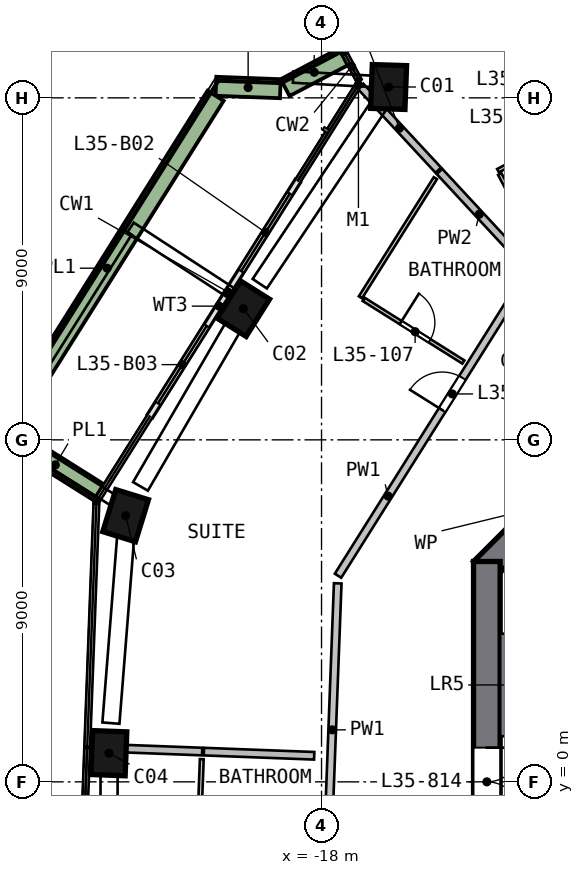
"""IFC4 building model, lengths in metres.
Left out: names, types, materials, properties, quantities, classifications, styles, units other than length and angle.
Written with IfcOpenShell. Run it as: python <this file> out.ifc"""

import sys

from ifc_helpers import new_model, si_unit, direction, frame, frame_2d, origin, origin_2d, place, context, subcontext, project, spatial, polyline, rectangle, outline, extrude, element, fill, save


model = new_model("IFC4")
c1 = context("Model", 3, precision=1e-05, world=origin(), true_north=direction((0.0, 1.0)))
c2 = subcontext(c1, "Body", "Model", "MODEL_VIEW")
j1 = project(units=[si_unit("LENGTHUNIT", "METRE"), si_unit("PLANEANGLEUNIT", "RADIAN")], contexts=[c1])
p1 = place(None, origin())
s1 = spatial("IfcSite", under=j1, at=p1, CompositionType="ELEMENT")
p2 = place(p1, origin())
s2 = spatial("IfcBuilding", under=s1, at=p2, CompositionType="ELEMENT")
p3 = place(p2, frame((0.0, 0.0, 147.0)))
s3 = spatial("IfcBuildingStorey", under=s2, at=p3, CompositionType="ELEMENT", Elevation=147.0)
p4 = place(p3, frame((-16.13, 18.379, 0.0), z_axis=(-0.086733435, -0.07745957, 0.993215649), x_axis=(0.030513173, 0.996298389, 0.080364579)))
e1 = element("IfcColumn", 1, at=p4, inside=s3, PredefinedType="COLUMN", context=c2, shape_type="SweptSolid", body=[
    extrude(rectangle(XDim=1.15, YDim=0.9, at=origin_2d()), origin(), (0.0, 0.0, 1.0), 3.212),
])
p5 = place(p3, frame((-19.986, 12.566, 0.0), z_axis=(-0.05893902, -0.095595288, 0.993673856), x_axis=(-0.528653619, -0.841376242, -0.112300359)))
e2 = element("IfcColumn", 2, at=p5, inside=s3, PredefinedType="COLUMN", context=c2, shape_type="SweptSolid", body=[
    extrude(rectangle(XDim=1.15, YDim=0.9, at=origin_2d()), origin(), (0.0, 0.0, 1.0), 3.21),
])
p6 = place(p3, frame((-23.116, 7.138, 0.0), z_axis=(-0.032995616, -0.110162783, 0.993365718), x_axis=(0.293088363, 0.949144669, 0.114993952)))
e3 = element("IfcColumn", 3, at=p6, inside=s3, PredefinedType="COLUMN", context=c2, shape_type="SweptSolid", body=[
    extrude(rectangle(XDim=1.15, YDim=0.9, at=origin_2d()), origin(), (0.0, 0.0, 1.0), 3.211),
])
p7 = place(p3, frame((-23.592, 0.89, 0.0), z_axis=(-0.003270139, -0.112325487, 0.993666086), x_axis=(-0.037343403, -0.992964581, -0.112369084)))
e4 = element("IfcColumn", 4, at=p7, inside=s3, PredefinedType="COLUMN", context=c2, shape_type="SweptSolid", body=[
    extrude(rectangle(XDim=1.15, YDim=0.9, at=origin_2d()), origin(), (0.0, 0.0, 1.0), 3.21),
])
p8 = place(p3, frame((-5.552, 13.752, 0.0), z_axis=(0.0, 0.0, 1.0), x_axis=(-0.707106781, -0.707106781, 0.0)))
e5 = element("IfcWall", 5, at=p8, inside=s3, PredefinedType="SHEAR", context=c2, shape_type="SweptSolid", body=[
    extrude(rectangle(XDim=11.598, YDim=0.7, at=frame_2d((5.799, 0.0))), origin(), (0.0, 0.0, 1.0), 3.5),
])
p9 = place(p3, frame((-13.65, 5.799, 0.0), z_axis=(0.0, 0.0, 1.0), x_axis=(0.0, -1.0, 0.0)))
e6 = element("IfcWall", 6, at=p9, inside=s3, PredefinedType="SHEAR", context=c2, shape_type="SweptSolid", body=[
    extrude(rectangle(XDim=11.598, YDim=0.7, at=frame_2d((5.799, 0.0))), origin(), (0.0, 0.0, 1.0), 3.5),
])
p10 = place(p9, frame((4.899, 0.0, 0.0)))
e7 = element("IfcOpeningElement", 7, at=p10, cuts=e6, PredefinedType="OPENING", context=c2, shape_type="SweptSolid", body=[
    extrude(rectangle(XDim=1.8, YDim=2.1, at=frame_2d((0.9, 1.05))), frame((0.0, 0.36, 0.0), z_axis=(0.0, -1.0, 0.0), x_axis=(1.0, 0.0, 0.0)), (0.0, 0.0, 1.0), 0.72),
])
p11 = place(p3, frame((-15.85, 20.109, 0.0), z_axis=(0.0, 0.0, 1.0), x_axis=(-0.884230925, -0.467049967, 0.0)))
e8 = element("IfcWall", 8, at=p11, inside=s3, PredefinedType="SOLIDWALL", context=c2, shape_type="SweptSolid", body=[
    extrude(rectangle(XDim=1.875, YDim=0.15, at=frame_2d((0.938, 0.0))), origin(), (0.0, 0.0, 1.0), 3.19),
])
p12 = place(p3, frame((-18.623, 15.814, 0.0), z_axis=(0.0, 0.0, 1.0), x_axis=(-0.532257872, -0.846582281, 0.0)))
e9 = element("IfcWall", 9, at=p12, inside=s3, PredefinedType="SOLIDWALL", context=c2, shape_type="SweptSolid", body=[
    extrude(rectangle(XDim=3.475, YDim=0.15, at=frame_2d((1.738, 0.0))), origin(), (0.0, 0.0, 1.0), 2.475),
])
p13 = place(p12, frame((0.4, 0.0, 0.0)))
e10 = element("IfcOpeningElement", 10, at=p13, cuts=e9, PredefinedType="OPENING", context=c2, shape_type="SweptSolid", body=[
    extrude(rectangle(XDim=2.4, YDim=2.4, at=frame_2d((1.2, 1.2))), frame((0.0, 0.085, 0.0), z_axis=(0.0, -1.0, 0.0), x_axis=(1.0, 0.0, 0.0)), (0.0, 0.0, 1.0), 0.17),
])
p14 = place(p3, frame((-20.473, 12.872, 0.0), z_axis=(0.0, 0.0, 1.0), x_axis=(-0.532337095, -0.846532467, 0.0)))
e11 = element("IfcWall", 11, at=p14, inside=s3, PredefinedType="SOLIDWALL", context=c2, shape_type="SweptSolid", body=[
    extrude(rectangle(XDim=3.835, YDim=0.15, at=frame_2d((1.918, 0.0))), origin(), (0.0, 0.0, 1.0), 2.475),
])
p15 = place(p14, frame((1.035, 0.0, 0.0)))
e12 = element("IfcOpeningElement", 12, at=p15, cuts=e11, PredefinedType="OPENING", context=c2, shape_type="SweptSolid", body=[
    extrude(rectangle(XDim=2.4, YDim=2.4, at=frame_2d((1.2, 1.2))), frame((0.0, 0.085, 0.0), z_axis=(0.0, -1.0, 0.0), x_axis=(1.0, 0.0, 0.0)), (0.0, 0.0, 1.0), 0.17),
])
p16 = place(p3, frame((-17.427, 19.078, 0.0), z_axis=(0.0, 0.0, 1.0), x_axis=(-0.884277997, -0.466960837, 0.0)))
e13 = element("IfcWall", 13, at=p16, inside=s3, PredefinedType="SOLIDWALL", context=c2, shape_type="SweptSolid", body=[
    extrude(rectangle(XDim=1.731, YDim=0.5, at=frame_2d((0.866, 0.0))), origin(), (0.0, 0.0, 1.0), 0.7),
])
p17 = place(p3, frame((-19.084, 18.24, 0.0), z_axis=(0.0, 0.0, 1.0), x_axis=(-0.999287738, 0.037736147, 0.0)))
e14 = element("IfcWall", 14, at=p17, inside=s3, PredefinedType="SOLIDWALL", context=c2, shape_type="SweptSolid", body=[
    extrude(rectangle(XDim=1.695, YDim=0.5, at=frame_2d((0.848, 0.0))), origin(), (0.0, 0.0, 1.0), 0.7),
])
p18 = place(p3, frame((-20.788, 18.055, 0.0), z_axis=(0.0, 0.0, 1.0), x_axis=(-0.532285818, -0.84656471, 0.0)))
e15 = element("IfcWall", 15, at=p18, inside=s3, PredefinedType="SOLIDWALL", context=c2, shape_type="SweptSolid", body=[
    extrude(rectangle(XDim=10.719, YDim=0.5, at=frame_2d((5.36, 0.0))), origin(), (0.0, 0.0, 1.0), 0.7),
])
p19 = place(p3, frame((-26.149, 9.059, 0.0), z_axis=(0.0, 0.0, 1.0), x_axis=(0.846546878, -0.532314177, 0.0)))
e16 = element("IfcWall", 16, at=p19, inside=s3, PredefinedType="SOLIDWALL", context=c2, shape_type="SweptSolid", body=[
    extrude(rectangle(XDim=2.699, YDim=0.5, at=frame_2d((1.35, 0.0))), origin(), (0.0, 0.0, 1.0), 0.7),
])
p20 = place(p3, origin())
e17 = element("IfcWall", 17, at=p20, inside=s3, PredefinedType="SOLIDWALL", context=c2, shape_type="SweptSolid", body=[
    extrude(outline(polyline([(-13.3, 3.9), (-10.9, 3.9), (-10.9, 3.7), (-12.9, 3.7), (-12.9, 1.4), (-10.9, 1.4), (-10.9, 1.2), (-13.3, 1.2), (-13.3, 3.9)])), origin(), (0.0, 0.0, 1.0), 3.19),
])
p21 = place(p3, frame((-17.917, -3.885, 0.0), z_axis=(0.0, 0.0, 1.0), x_axis=(0.037683274, 0.999289733, 0.0)))
e18 = element("IfcWall", 18, at=p21, inside=s3, PredefinedType="SOLIDWALL", context=c2, shape_type="SweptSolid", body=[
    extrude(rectangle(XDim=9.116, YDim=0.2, at=frame_2d((4.558, 0.0))), origin(), (0.0, 0.0, 1.0), 3.19),
])
p22 = place(p21, frame((0.2, 0.0, 0.0)))
e19 = element("IfcOpeningElement", 19, at=p22, cuts=e18, PredefinedType="OPENING", context=c2, shape_type="SweptSolid", body=[
    extrude(rectangle(XDim=1.0, YDim=2.1, at=frame_2d((0.5, 1.05))), frame((0.0, 0.11, 0.0), z_axis=(0.0, -1.0, 0.0), x_axis=(1.0, 0.0, 0.0)), (0.0, 0.0, 1.0), 0.22),
])
p23 = place(p3, frame((-17.566, 5.425, 0.0), z_axis=(0.0, 0.0, 1.0), x_axis=(0.532300792, 0.846555294, 0.0)))
e20 = element("IfcWall", 20, at=p23, inside=s3, PredefinedType="SOLIDWALL", context=c2, shape_type="SweptSolid", body=[
    extrude(rectangle(XDim=9.516, YDim=0.2, at=frame_2d((4.758, 0.0))), origin(), (0.0, 0.0, 1.0), 3.19),
])
p24 = place(p23, frame((5.15, 0.0, 0.0)))
e21 = element("IfcOpeningElement", 21, at=p24, cuts=e20, PredefinedType="OPENING", context=c2, shape_type="SweptSolid", body=[
    extrude(rectangle(XDim=1.0, YDim=2.1, at=frame_2d((0.5, 1.05))), frame((0.0, 0.11, 0.0), z_axis=(0.0, -1.0, 0.0), x_axis=(1.0, 0.0, 0.0)), (0.0, 0.0, 1.0), 0.22),
])
p25 = place(p3, frame((-21.141, 0.797, 0.0), z_axis=(0.0, 0.0, 1.0), x_axis=(-0.999288645, 0.037712126, 0.0)))
e22 = element("IfcWall", 22, at=p25, inside=s3, PredefinedType="SOLIDWALL", context=c2, shape_type="SweptSolid", body=[
    extrude(rectangle(XDim=2.952, YDim=0.2, at=frame_2d((1.476, 0.0))), origin(), (0.0, 0.0, 1.0), 3.19),
])
p26 = place(p3, frame((-18.193, 0.686, 0.0), z_axis=(0.0, 0.0, 1.0), x_axis=(-0.999290793, 0.037655167, 0.0)))
e23 = element("IfcWall", 23, at=p26, inside=s3, PredefinedType="SOLIDWALL", context=c2, shape_type="SweptSolid", body=[
    extrude(rectangle(XDim=2.905, YDim=0.2, at=frame_2d((1.452, 0.0))), origin(), (0.0, 0.0, 1.0), 3.19),
])
p27 = place(p3, frame((-14.927, 16.097, 0.0), z_axis=(0.0, 0.0, 1.0), x_axis=(-0.679972059, 0.733238023, 0.0)))
e24 = element("IfcWall", 24, at=p27, inside=s3, PredefinedType="SOLIDWALL", context=c2, shape_type="SweptSolid", body=[
    extrude(rectangle(XDim=3.011, YDim=0.2, at=frame_2d((1.506, 0.0))), origin(), (0.0, 0.0, 1.0), 2.69),
])
p28 = place(p3, frame((-12.805, 13.809, 0.0), z_axis=(0.0, 0.0, 1.0), x_axis=(-0.679924039, 0.733282552, 0.0)))
e25 = element("IfcWall", 25, at=p28, inside=s3, PredefinedType="SOLIDWALL", context=c2, shape_type="SweptSolid", body=[
    extrude(rectangle(XDim=3.075, YDim=0.2, at=frame_2d((1.537, 0.0))), origin(), (0.0, 0.0, 1.0), 3.19),
])
p29 = place(p3, frame((-21.253, -2.101, 0.0), z_axis=(0.0, 0.0, 1.0), x_axis=(0.037703899, 0.999288955, 0.0)))
e26 = element("IfcWall", 26, at=p29, inside=s3, PredefinedType="PARTITIONING", context=c2, shape_type="SweptSolid", body=[
    extrude(rectangle(XDim=2.7, YDim=0.1, at=frame_2d((1.35, 0.0))), origin(), (0.0, 0.0, 1.0), 3.19),
])
p30 = place(p3, frame((-16.976, 12.751, 0.0), z_axis=(0.0, 0.0, 1.0), x_axis=(0.532295725, 0.846558481, 0.0)))
e27 = element("IfcWall", 27, at=p30, inside=s3, PredefinedType="PARTITIONING", context=c2, shape_type="SweptSolid", body=[
    extrude(rectangle(XDim=3.704, YDim=0.1, at=frame_2d((1.852, 0.0))), origin(), (0.0, 0.0, 1.0), 3.19),
])
p31 = place(p3, frame((-16.891, 12.698, 0.0), z_axis=(0.0, 0.0, 1.0), x_axis=(0.846583824, -0.532255417, 0.0)))
e28 = element("IfcWall", 28, at=p31, inside=s3, PredefinedType="PARTITIONING", context=c2, shape_type="SweptSolid", body=[
    extrude(rectangle(XDim=3.1, YDim=0.1, at=frame_2d((1.55, 0.0))), origin(), (0.0, 0.0, 1.0), 3.19),
])
p32 = place(p31, frame((1.15, 0.0, 0.0)))
e29 = element("IfcOpeningElement", 29, at=p32, cuts=e28, PredefinedType="OPENING", context=c2, shape_type="SweptSolid", body=[
    extrude(rectangle(XDim=0.9, YDim=2.1, at=frame_2d((0.45, 1.05))), frame((0.0, 0.06, 0.0), z_axis=(0.0, -1.0, 0.0), x_axis=(1.0, 0.0, 0.0)), (0.0, 0.0, 1.0), 0.12),
])
p33 = place(p3, frame((-12.189, 13.872, 0.0), z_axis=(0.0, 0.0, 1.0), x_axis=(-0.46699949, 0.884257585, 0.0)))
e30 = element("IfcWall", 30, at=p33, inside=s3, PredefinedType="PARTITIONING", context=c2, shape_type="SweptSolid", body=[
    extrude(rectangle(XDim=2.4, YDim=0.1, at=frame_2d((1.2, 0.0))), origin(), (0.0, 0.0, 1.0), 3.19),
])
p34 = place(p3, frame((-10.704, 17.483, 0.0), z_axis=(0.0, 0.0, 1.0), x_axis=(-0.884244746, -0.467023799, 0.0)))
e31 = element("IfcWall", 31, at=p34, inside=s3, PredefinedType="PARTITIONING", context=c2, shape_type="SweptSolid", body=[
    extrude(rectangle(XDim=3.0, YDim=0.1, at=frame_2d((1.5, 0.0))), origin(), (0.0, 0.0, 1.0), 3.19),
])
p35 = place(p34, frame((0.95, 0.0, 0.0)))
e32 = element("IfcOpeningElement", 32, at=p35, cuts=e31, PredefinedType="OPENING", context=c2, shape_type="SweptSolid", body=[
    extrude(rectangle(XDim=0.9, YDim=2.1, at=frame_2d((0.45, 1.05))), frame((0.0, 0.06, 0.0), z_axis=(0.0, -1.0, 0.0), x_axis=(1.0, 0.0, 0.0)), (0.0, 0.0, 1.0), 0.12),
])
p36 = place(p13, origin())
e33 = element("IfcDoor", 33, at=p36, inside=s3, OperationType="SLIDING_TO_RIGHT", PredefinedType="DOOR", context=c2, shape_type="SweptSolid", body=[
    extrude(rectangle(XDim=2.4, YDim=2.4, at=frame_2d((1.2, 1.2))), frame((0.0, 0.025, 0.0), z_axis=(0.0, -1.0, 0.0), x_axis=(1.0, 0.0, 0.0)), (0.0, 0.0, 1.0), 0.05),
])
fill(e10, e33)
p37 = place(p15, origin())
e34 = element("IfcDoor", 34, at=p37, inside=s3, OperationType="SLIDING_TO_LEFT", PredefinedType="DOOR", context=c2, shape_type="SweptSolid", body=[
    extrude(rectangle(XDim=2.4, YDim=2.4, at=frame_2d((1.2, 1.2))), frame((0.0, 0.025, 0.0), z_axis=(0.0, -1.0, 0.0), x_axis=(1.0, 0.0, 0.0)), (0.0, 0.0, 1.0), 0.05),
])
fill(e12, e34)
p38 = place(p10, origin())
e35 = element("IfcDoor", 35, at=p38, inside=s3, OperationType="DOUBLE_DOOR_SINGLE_SWING", PredefinedType="DOOR", context=c2, shape_type="SweptSolid", body=[
    extrude(rectangle(XDim=1.8, YDim=2.1, at=frame_2d((0.9, 1.05))), frame((0.0, 0.025, 0.0), z_axis=(0.0, -1.0, 0.0), x_axis=(1.0, 0.0, 0.0)), (0.0, 0.0, 1.0), 0.05),
])
fill(e7, e35)
p39 = place(p24, origin())
e36 = element("IfcDoor", 36, at=p39, inside=s3, OperationType="SINGLE_SWING_LEFT", PredefinedType="DOOR", context=c2, shape_type="SweptSolid", body=[
    extrude(rectangle(XDim=1.0, YDim=2.1, at=frame_2d((0.5, 1.05))), frame((0.0, 0.025, 0.0), z_axis=(0.0, -1.0, 0.0), x_axis=(1.0, 0.0, 0.0)), (0.0, 0.0, 1.0), 0.05),
])
fill(e21, e36)
p40 = place(p32, origin())
e37 = element("IfcDoor", 37, at=p40, inside=s3, OperationType="SINGLE_SWING_LEFT", PredefinedType="DOOR", context=c2, shape_type="SweptSolid", body=[
    extrude(rectangle(XDim=0.9, YDim=2.1, at=frame_2d((0.45, 1.05))), frame((0.0, 0.025, 0.0), z_axis=(0.0, -1.0, 0.0), x_axis=(1.0, 0.0, 0.0)), (0.0, 0.0, 1.0), 0.05),
])
fill(e29, e37)
save(model, sys.argv[1])
